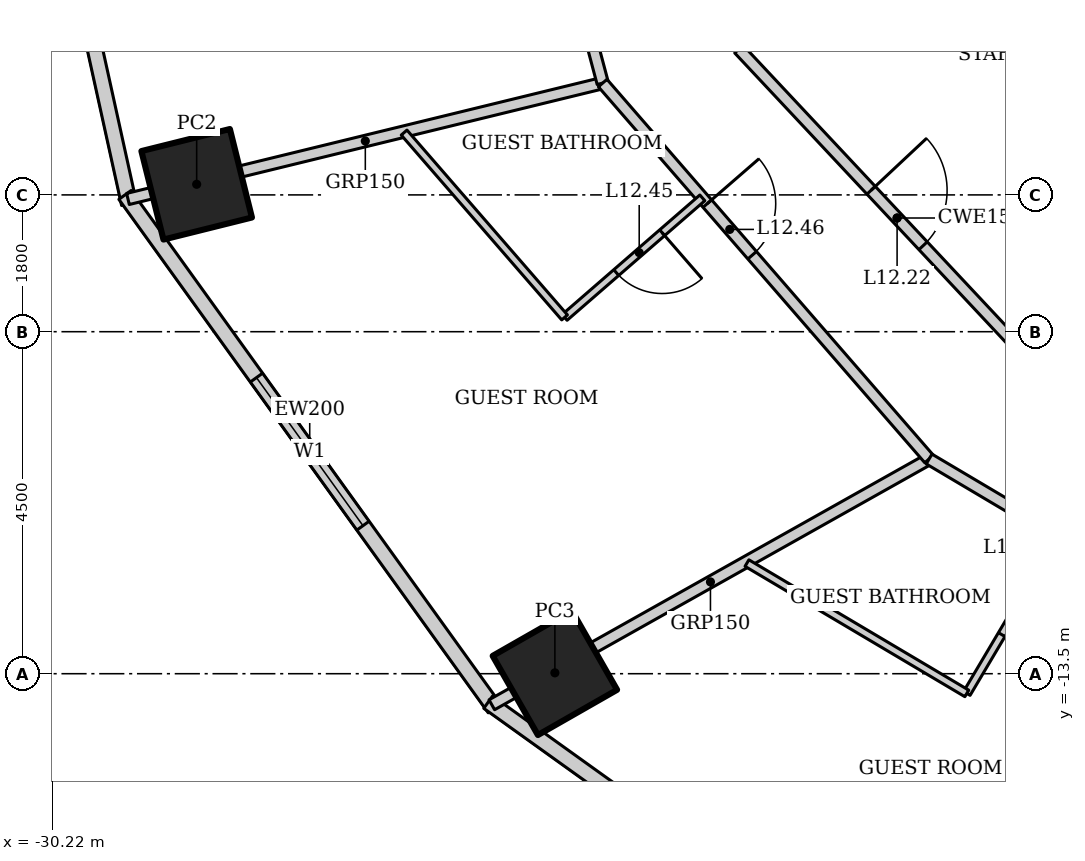
"""IFC4 building model, lengths in metres.
Left out: names, types, materials, properties, quantities, classifications, styles, units other than length and angle.
Written with IfcOpenShell. Run it as: python <this file> out.ifc"""

import sys

from ifc_helpers import new_model, si_unit, direction, frame, frame_2d, origin, origin_2d, place, context, subcontext, project, spatial, rectangle, hollow_rectangle, extrude, element, fill, save


model = new_model("IFC4")
c1 = context("Model", 3, precision=1e-05, world=origin(), true_north=direction((0.0, 1.0)))
c2 = subcontext(c1, "Body", "Model", "MODEL_VIEW")
j1 = project(units=[si_unit("LENGTHUNIT", "METRE"), si_unit("PLANEANGLEUNIT", "RADIAN")], contexts=[c1])
p1 = place(None, origin())
s1 = spatial("IfcSite", under=j1, at=p1, CompositionType="ELEMENT")
p2 = place(p1, origin())
s2 = spatial("IfcBuilding", under=s1, at=p2, CompositionType="ELEMENT")
p3 = place(p2, frame((0.0, 0.0, 58.6)))
s3 = spatial("IfcBuildingStorey", under=s2, at=p3, CompositionType="ELEMENT", Elevation=58.6)
p4 = place(p3, frame((-28.318, -7.06, 0.0), z_axis=(0.0, 0.0, 1.0), x_axis=(0.970295726276, 0.2419218956, 0.0)))
e1 = element("IfcColumn", 1, at=p4, inside=s3, PredefinedType="COLUMN", context=c2, shape_type="SweptSolid", body=[
    extrude(hollow_rectangle(XDim=1.2, YDim=1.2, WallThickness=0.1, at=origin_2d()), origin(), (0.0, 0.0, 1.0), 3.6),
])
p5 = place(p3, frame((-23.605, -13.489, 0.0), z_axis=(0.0, 0.0, 1.0), x_axis=(0.86824298017, 0.496139221777, 0.0)))
e2 = element("IfcColumn", 2, at=p5, inside=s3, PredefinedType="COLUMN", context=c2, shape_type="SweptSolid", body=[
    extrude(hollow_rectangle(XDim=1.2, YDim=1.2, WallThickness=0.12, at=origin_2d()), origin(), (0.0, 0.0, 1.0), 3.6),
])
p6 = place(p3, frame((-30.835, 0.067, 0.0), z_axis=(0.0, 0.0, 1.0), x_axis=(0.215238065514, -0.976561608478, 0.0)))
e3 = element("IfcWall", 3, at=p6, inside=s3, PredefinedType="SOLIDWALL", context=c2, shape_type="SweptSolid", body=[
    extrude(rectangle(XDim=7.562, YDim=0.2, at=frame_2d((3.781, 0.0))), origin(), (0.0, 0.0, 1.0), 3.45),
])
p7 = place(p6, frame((2.581, 0.0, 0.5)))
e4 = element("IfcOpeningElement", 4, at=p7, cuts=e3, PredefinedType="OPENING", context=c2, shape_type="SweptSolid", body=[
    extrude(rectangle(XDim=2.4, YDim=2.2, at=frame_2d((1.2, 1.1))), frame((0.0, 0.11, 0.0), z_axis=(0.0, -1.0, 0.0), x_axis=(1.0, 0.0, 0.0)), (0.0, 0.0, 1.0), 0.22),
])
p8 = place(p3, frame((-29.26, -7.2, 0.0), z_axis=(0.0, 0.0, 1.0), x_axis=(0.583937613703, -0.811798536155, 0.0)))
e5 = element("IfcWall", 5, at=p8, inside=s3, PredefinedType="SOLIDWALL", context=c2, shape_type="SweptSolid", body=[
    extrude(rectangle(XDim=8.323, YDim=0.2, at=frame_2d((4.162, 0.0))), origin(), (0.0, 0.0, 1.0), 3.45),
])
p9 = place(p8, frame((2.961, 0.0, 0.5)))
e6 = element("IfcOpeningElement", 6, at=p9, cuts=e5, PredefinedType="OPENING", context=c2, shape_type="SweptSolid", body=[
    extrude(rectangle(XDim=2.4, YDim=2.2, at=frame_2d((1.2, 1.1))), frame((0.0, 0.11, 0.0), z_axis=(0.0, -1.0, 0.0), x_axis=(1.0, 0.0, 0.0)), (0.0, 0.0, 1.0), 0.22),
])
p10 = place(p3, frame((-24.482, -13.875, 0.0), z_axis=(0.0, 0.0, 1.0), x_axis=(0.812791321576, -0.582554948112, 0.0)))
e7 = element("IfcWall", 7, at=p10, inside=s3, PredefinedType="SOLIDWALL", context=c2, shape_type="SweptSolid", body=[
    extrude(rectangle(XDim=8.063, YDim=0.2, at=frame_2d((4.032, 0.0))), origin(), (0.0, 0.0, 1.0), 3.45),
])
p11 = place(p10, frame((2.832, 0.0, 0.5)))
e8 = element("IfcOpeningElement", 8, at=p11, cuts=e7, PredefinedType="OPENING", context=c2, shape_type="SweptSolid", body=[
    extrude(rectangle(XDim=2.4, YDim=2.2, at=frame_2d((1.2, 1.1))), frame((0.0, 0.11, 0.0), z_axis=(0.0, -1.0, 0.0), x_axis=(1.0, 0.0, 0.0)), (0.0, 0.0, 1.0), 0.22),
])
p12 = place(p3, frame((-29.222, -7.254, 0.0), z_axis=(0.0, 0.0, 1.0), x_axis=(0.971456980633, 0.237215797913, 0.0)))
e9 = element("IfcWall", 9, at=p12, inside=s3, PredefinedType="PARTITIONING", context=c2, shape_type="SweptSolid", body=[
    extrude(rectangle(XDim=6.429, YDim=0.15, at=frame_2d((3.215, 0.0))), origin(), (0.0, 0.0, 1.0), 2.332),
])
p13 = place(p3, frame((-24.435, -13.909, 0.0), z_axis=(0.0, 0.0, 1.0), x_axis=(0.871747379892, 0.489955616001, 0.0)))
e10 = element("IfcWall", 10, at=p13, inside=s3, PredefinedType="PARTITIONING", context=c2, shape_type="SweptSolid", body=[
    extrude(rectangle(XDim=6.6, YDim=0.15, at=frame_2d((3.3, 0.0))), origin(), (0.0, 0.0, 1.0), 2.693),
])
p14 = place(p3, frame((-17.97, -18.542, 0.0), z_axis=(0.0, 0.0, 1.0), x_axis=(0.699736251994, 0.714401272147, 0.0)))
e11 = element("IfcWall", 11, at=p14, inside=s3, PredefinedType="PARTITIONING", context=c2, shape_type="SweptSolid", body=[
    extrude(rectangle(XDim=6.593, YDim=0.15, at=frame_2d((3.296, 0.0))), origin(), (0.0, 0.0, 1.0), 2.528),
])
p15 = place(p3, frame((-24.5, 0.0, 0.0), z_axis=(0.0, 0.0, 1.0), x_axis=(0.257083265334, -0.966389256296, 0.0)))
e12 = element("IfcWall", 12, at=p15, inside=s3, PredefinedType="PARTITIONING", context=c2, shape_type="SweptSolid", body=[
    extrude(rectangle(XDim=5.928, YDim=0.15, at=frame_2d((2.964, 0.0))), origin(), (0.0, 0.0, 1.0), 3.45),
])
p16 = place(p15, frame((2.1, 0.0, 0.0)))
e13 = element("IfcOpeningElement", 13, at=p16, cuts=e12, PredefinedType="OPENING", context=c2, shape_type="SweptSolid", body=[
    extrude(rectangle(XDim=0.9, YDim=2.1, at=frame_2d((0.45, 1.05))), frame((0.0, 0.085, 0.0), z_axis=(0.0, -1.0, 0.0), x_axis=(1.0, 0.0, 0.0)), (0.0, 0.0, 1.0), 0.17),
])
p17 = place(p3, frame((-22.976, -5.729, 0.0), z_axis=(0.0, 0.0, 1.0), x_axis=(0.655599989166, -0.755108372491, 0.0)))
e14 = element("IfcWall", 14, at=p17, inside=s3, PredefinedType="PARTITIONING", context=c2, shape_type="SweptSolid", body=[
    extrude(rectangle(XDim=6.551, YDim=0.15, at=frame_2d((3.275, 0.0))), origin(), (0.0, 0.0, 1.0), 3.45),
])
p18 = place(p17, frame((2.1, 0.0, 0.0)))
e15 = element("IfcOpeningElement", 15, at=p18, cuts=e14, PredefinedType="OPENING", context=c2, shape_type="SweptSolid", body=[
    extrude(rectangle(XDim=0.9, YDim=2.1, at=frame_2d((0.45, 1.05))), frame((0.0, 0.085, 0.0), z_axis=(0.0, -1.0, 0.0), x_axis=(1.0, 0.0, 0.0)), (0.0, 0.0, 1.0), 0.17),
])
p19 = place(p3, frame((-18.681, -10.675, 0.0), z_axis=(0.0, 0.0, 1.0), x_axis=(0.860147339762, -0.510045639036, 0.0)))
e16 = element("IfcWall", 16, at=p19, inside=s3, PredefinedType="PARTITIONING", context=c2, shape_type="SweptSolid", body=[
    extrude(rectangle(XDim=6.19, YDim=0.15, at=frame_2d((3.095, 0.0))), origin(), (0.0, 0.0, 1.0), 3.45),
])
p20 = place(p19, frame((2.505, 0.0, 0.0)))
e17 = element("IfcOpeningElement", 17, at=p20, cuts=e16, PredefinedType="OPENING", context=c2, shape_type="SweptSolid", body=[
    extrude(rectangle(XDim=0.9, YDim=2.1, at=frame_2d((0.45, 1.05))), frame((0.0, 0.085, 0.0), z_axis=(0.0, -1.0, 0.0), x_axis=(1.0, 0.0, 0.0)), (0.0, 0.0, 1.0), 0.17),
])
p21 = place(p3, frame((-21.184, -5.282, 0.0), z_axis=(0.0, 0.0, 1.0), x_axis=(0.68365836236, -0.729802194828, 0.0)))
e18 = element("IfcWall", 18, at=p21, inside=s3, PredefinedType="PARTITIONING", context=c2, shape_type="SweptSolid", body=[
    extrude(rectangle(XDim=6.09, YDim=0.15, at=frame_2d((3.045, 0.0))), origin(), (0.0, 0.0, 1.0), 3.45),
])
p22 = place(p21, frame((2.545, 0.0, 0.0)))
e19 = element("IfcOpeningElement", 19, at=p22, cuts=e18, PredefinedType="OPENING", context=c2, shape_type="SweptSolid", body=[
    extrude(rectangle(XDim=1.0, YDim=2.1, at=frame_2d((0.5, 1.05))), frame((0.0, 0.085, 0.0), z_axis=(0.0, -1.0, 0.0), x_axis=(1.0, 0.0, 0.0)), (0.0, 0.0, 1.0), 0.17),
])
p23 = place(p3, frame((-21.665, -7.239, 0.0), z_axis=(0.0, 0.0, 1.0), x_axis=(-0.755098052661, -0.655611875172, 0.0)))
e20 = element("IfcWall", 20, at=p23, inside=s3, PredefinedType="PARTITIONING", context=c2, shape_type="SweptSolid", body=[
    extrude(rectangle(XDim=2.4, YDim=0.1, at=frame_2d((1.2, 0.0))), origin(), (0.0, 0.0, 1.0), 3.45),
])
p24 = place(p23, frame((0.7, 0.0, 0.0)))
e21 = element("IfcOpeningElement", 21, at=p24, cuts=e20, PredefinedType="OPENING", context=c2, shape_type="SweptSolid", body=[
    extrude(rectangle(XDim=0.8, YDim=2.1, at=frame_2d((0.4, 1.05))), frame((0.0, 0.06, 0.0), z_axis=(0.0, -1.0, 0.0), x_axis=(1.0, 0.0, 0.0)), (0.0, 0.0, 1.0), 0.12),
])
p25 = place(p3, frame((-23.477, -8.812, 0.0), z_axis=(0.0, 0.0, 1.0), x_axis=(-0.655596826012, 0.755111118792, 0.0)))
e22 = element("IfcWall", 22, at=p25, inside=s3, PredefinedType="PARTITIONING", context=c2, shape_type="SweptSolid", body=[
    extrude(rectangle(XDim=3.221, YDim=0.1, at=frame_2d((1.611, 0.0))), origin(), (0.0, 0.0, 1.0), 3.45),
])
p26 = place(p3, frame((-16.961, -11.695, 0.0), z_axis=(0.0, 0.0, 1.0), x_axis=(-0.510075642074, -0.860129548012, 0.0)))
e23 = element("IfcWall", 23, at=p26, inside=s3, PredefinedType="PARTITIONING", context=c2, shape_type="SweptSolid", body=[
    extrude(rectangle(XDim=2.4, YDim=0.1, at=frame_2d((1.2, 0.0))), origin(), (0.0, 0.0, 1.0), 3.45),
])
p27 = place(p26, frame((0.7, 0.0, 0.0)))
e24 = element("IfcOpeningElement", 24, at=p27, cuts=e23, PredefinedType="OPENING", context=c2, shape_type="SweptSolid", body=[
    extrude(rectangle(XDim=0.8, YDim=2.1, at=frame_2d((0.4, 1.05))), frame((0.0, 0.06, 0.0), z_axis=(0.0, -1.0, 0.0), x_axis=(1.0, 0.0, 0.0)), (0.0, 0.0, 1.0), 0.12),
])
p28 = place(p3, frame((-18.185, -13.76, 0.0), z_axis=(0.0, 0.0, 1.0), x_axis=(-0.860146437071, 0.510047161343, 0.0)))
e25 = element("IfcWall", 25, at=p28, inside=s3, PredefinedType="PARTITIONING", context=c2, shape_type="SweptSolid", body=[
    extrude(rectangle(XDim=3.363, YDim=0.1, at=frame_2d((1.681, 0.0))), origin(), (0.0, 0.0, 1.0), 3.45),
])
p29 = place(p9, origin())
e26 = element("IfcWindow", 26, at=p29, inside=s3, PartitioningType="SINGLE_PANEL", PredefinedType="WINDOW", context=c2, shape_type="SweptSolid", body=[
    extrude(rectangle(XDim=2.4, YDim=2.2, at=frame_2d((1.2, 1.1))), frame((0.0, 0.03, 0.0), z_axis=(0.0, -1.0, 0.0), x_axis=(1.0, 0.0, 0.0)), (0.0, 0.0, 1.0), 0.06),
])
fill(e6, e26)
p30 = place(p22, origin())
e27 = element("IfcDoor", 27, at=p30, inside=s3, OperationType="SINGLE_SWING_LEFT", PredefinedType="DOOR", context=c2, shape_type="SweptSolid", body=[
    extrude(rectangle(XDim=1.0, YDim=2.1, at=frame_2d((0.5, 1.05))), frame((0.0, 0.025, 0.0), z_axis=(0.0, -1.0, 0.0), x_axis=(1.0, 0.0, 0.0)), (0.0, 0.0, 1.0), 0.05),
])
fill(e19, e27)
p31 = place(p24, origin())
e28 = element("IfcDoor", 28, at=p31, inside=s3, OperationType="SINGLE_SWING_LEFT", PredefinedType="DOOR", context=c2, shape_type="SweptSolid", body=[
    extrude(rectangle(XDim=0.8, YDim=2.1, at=frame_2d((0.4, 1.05))), frame((0.0, 0.025, 0.0), z_axis=(0.0, -1.0, 0.0), x_axis=(1.0, 0.0, 0.0)), (0.0, 0.0, 1.0), 0.05),
])
fill(e21, e28)
p32 = place(p18, origin())
e29 = element("IfcDoor", 29, at=p32, inside=s3, OperationType="SINGLE_SWING_LEFT", PredefinedType="DOOR", context=c2, shape_type="SweptSolid", body=[
    extrude(rectangle(XDim=0.9, YDim=2.1, at=frame_2d((0.45, 1.05))), frame((0.0, 0.025, 0.0), z_axis=(0.0, -1.0, 0.0), x_axis=(1.0, 0.0, 0.0)), (0.0, 0.0, 1.0), 0.05),
])
fill(e15, e29)
p33 = place(p27, origin())
e30 = element("IfcDoor", 30, at=p33, inside=s3, OperationType="SINGLE_SWING_LEFT", PredefinedType="DOOR", context=c2, shape_type="SweptSolid", body=[
    extrude(rectangle(XDim=0.8, YDim=2.1, at=frame_2d((0.4, 1.05))), frame((0.0, 0.025, 0.0), z_axis=(0.0, -1.0, 0.0), x_axis=(1.0, 0.0, 0.0)), (0.0, 0.0, 1.0), 0.05),
])
fill(e24, e30)
save(model, sys.argv[1])
